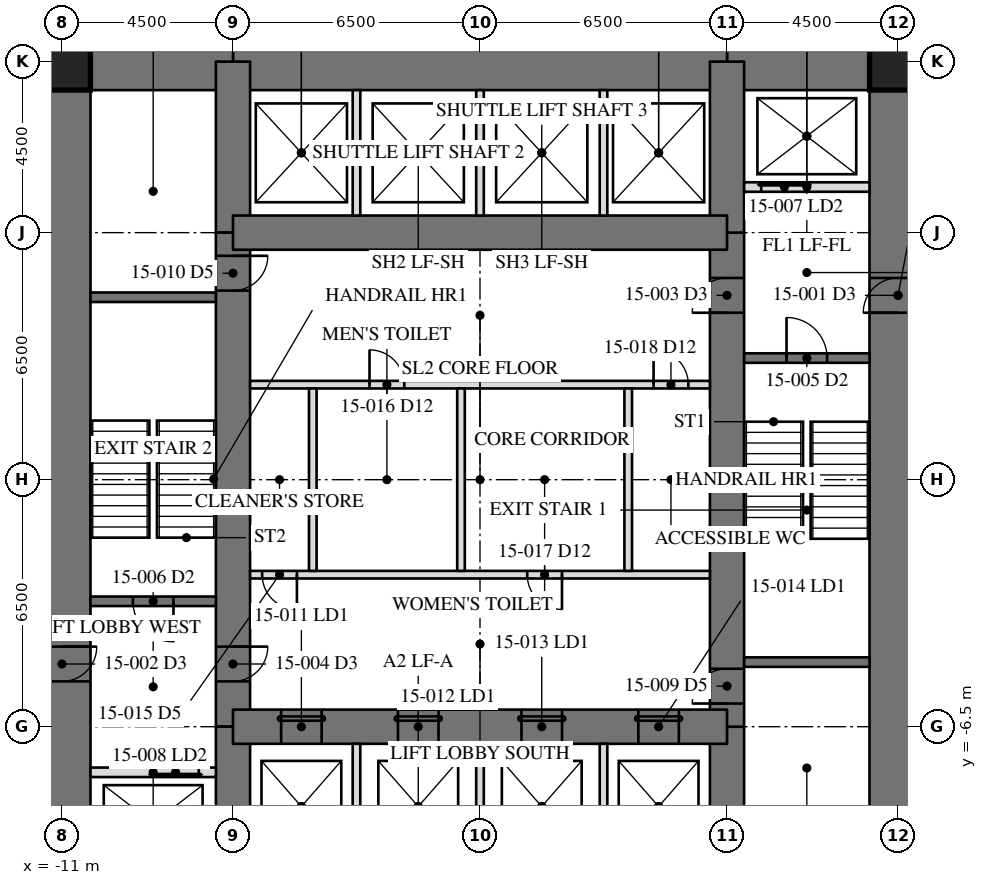
"""IFC4 building model, lengths in metres.
Left out: names, types, materials, properties, quantities, classifications, styles, units other than length and angle.
Written with IfcOpenShell. Run it as: python <this file> out.ifc"""

import sys

from ifc_helpers import new_model, si_unit, direction, frame, frame_2d, origin, origin_2d, place, context, subcontext, project, spatial, rectangle, hollow_rectangle, extrude, element, fill, save


model = new_model("IFC4")
c1 = context("Model", 3, precision=1e-05, world=origin(), true_north=direction((0.0, 1.0)))
c2 = subcontext(c1, "Body", "Model", "MODEL_VIEW")
j1 = project(units=[si_unit("LENGTHUNIT", "METRE"), si_unit("PLANEANGLEUNIT", "RADIAN")], contexts=[c1])
p1 = place(None, origin())
s1 = spatial("IfcSite", under=j1, at=p1, CompositionType="ELEMENT")
p2 = place(p1, origin())
s2 = spatial("IfcBuilding", under=s1, at=p2, CompositionType="ELEMENT")
p3 = place(p2, frame((0.0, 0.0, 65.2)))
s3 = spatial("IfcBuildingStorey", under=s2, at=p3, CompositionType="ELEMENT", Elevation=65.2)
p4 = place(p3, frame((11.0, -11.0, 0.0), z_axis=(0.0, 0.0, 1.0), x_axis=(0.0, 1.0, 0.0)))
e1 = element("IfcWall", 1, at=p4, inside=s3, PredefinedType="SHEAR", context=c2, shape_type="SweptSolid", body=[
    extrude(rectangle(XDim=22.0, YDim=1.5, at=frame_2d((11.0, 0.0))), origin(), (0.0, 0.0, 1.0), 4.1),
])
p5 = place(p4, frame((15.393, 0.0, 0.0)))
e2 = element("IfcOpeningElement", 2, at=p5, cuts=e1, PredefinedType="OPENING", context=c2, shape_type="SweptSolid", body=[
    extrude(rectangle(XDim=0.915, YDim=2.134, at=frame_2d((0.458, 1.067))), frame((0.0, 0.76, 0.0), z_axis=(0.0, -1.0, 0.0), x_axis=(1.0, 0.0, 0.0)), (0.0, 0.0, 1.0), 1.52),
])
p6 = place(p3, frame((-11.0, 11.0, 0.0), z_axis=(0.0, 0.0, 1.0), x_axis=(0.0, -1.0, 0.0)))
e3 = element("IfcWall", 3, at=p6, inside=s3, PredefinedType="SHEAR", context=c2, shape_type="SweptSolid", body=[
    extrude(rectangle(XDim=22.0, YDim=1.5, at=frame_2d((11.0, 0.0))), origin(), (0.0, 0.0, 1.0), 4.1),
])
p7 = place(p6, frame((15.393, 0.0, 0.0)))
e4 = element("IfcOpeningElement", 4, at=p7, cuts=e3, PredefinedType="OPENING", context=c2, shape_type="SweptSolid", body=[
    extrude(rectangle(XDim=0.915, YDim=2.134, at=frame_2d((0.458, 1.067))), frame((0.0, 0.76, 0.0), z_axis=(0.0, -1.0, 0.0), x_axis=(1.0, 0.0, 0.0)), (0.0, 0.0, 1.0), 1.52),
])
p8 = place(p3, frame((11.0, 11.0, 0.0), z_axis=(0.0, 0.0, 1.0), x_axis=(-1.0, 0.0, 0.0)))
e5 = element("IfcWall", 5, at=p8, inside=s3, PredefinedType="SHEAR", context=c2, shape_type="SweptSolid", body=[
    extrude(rectangle(XDim=4.5, YDim=1.5, at=frame_2d((2.25, 0.0))), origin(), (0.0, 0.0, 1.0), 4.1),
])
p9 = place(p3, frame((6.5, 11.0, 0.0), z_axis=(0.0, 0.0, 1.0), x_axis=(-1.0, 0.0, 0.0)))
e6 = element("IfcWall", 6, at=p9, inside=s3, PredefinedType="SHEAR", context=c2, shape_type="SweptSolid", body=[
    extrude(rectangle(XDim=13.0, YDim=1.5, at=frame_2d((6.5, 0.0))), origin(), (0.0, 0.0, 1.0), 4.1),
])
p10 = place(p3, frame((-6.5, 11.0, 0.0), z_axis=(0.0, 0.0, 1.0), x_axis=(-1.0, 0.0, 0.0)))
e7 = element("IfcWall", 7, at=p10, inside=s3, PredefinedType="SHEAR", context=c2, shape_type="SweptSolid", body=[
    extrude(rectangle(XDim=4.5, YDim=1.5, at=frame_2d((2.25, 0.0))), origin(), (0.0, 0.0, 1.0), 4.1),
])
p11 = place(p3, frame((6.5, -11.0, 0.0), z_axis=(0.0, 0.0, 1.0), x_axis=(0.0, 1.0, 0.0)))
e8 = element("IfcWall", 8, at=p11, inside=s3, PredefinedType="SHEAR", context=c2, shape_type="SweptSolid", body=[
    extrude(rectangle(XDim=4.5, YDim=0.9, at=frame_2d((2.25, 0.0))), origin(), (0.0, 0.0, 1.0), 4.1),
])
p12 = place(p3, frame((6.5, -6.5, 0.0), z_axis=(0.0, 0.0, 1.0), x_axis=(0.0, 1.0, 0.0)))
e9 = element("IfcWall", 9, at=p12, inside=s3, PredefinedType="SHEAR", context=c2, shape_type="SweptSolid", body=[
    extrude(rectangle(XDim=13.0, YDim=0.9, at=frame_2d((6.5, 0.0))), origin(), (0.0, 0.0, 1.0), 4.1),
])
p13 = place(p12, frame((10.893, 0.0, 0.0)))
e10 = element("IfcOpeningElement", 10, at=p13, cuts=e9, PredefinedType="OPENING", context=c2, shape_type="SweptSolid", body=[
    extrude(rectangle(XDim=0.915, YDim=2.134, at=frame_2d((0.458, 1.067))), frame((0.0, 0.46, 0.0), z_axis=(0.0, -1.0, 0.0), x_axis=(1.0, 0.0, 0.0)), (0.0, 0.0, 1.0), 0.92),
])
p14 = place(p12, frame((0.61, 0.0, 0.0)))
e11 = element("IfcOpeningElement", 11, at=p14, cuts=e9, PredefinedType="OPENING", context=c2, shape_type="SweptSolid", body=[
    extrude(rectangle(XDim=0.915, YDim=2.134, at=frame_2d((0.458, 1.067))), frame((0.0, 0.46, 0.0), z_axis=(0.0, -1.0, 0.0), x_axis=(1.0, 0.0, 0.0)), (0.0, 0.0, 1.0), 0.92),
])
for number, where, z_axis, x_axis in (
    (12, (6.5, 6.5, 0.0), (0.0, 0.0, 1.0), (0.0, 1.0, 0.0)),
    (13, (-6.5, 11.0, 0.0), (0.0, 0.0, 1.0), (0.0, -1.0, 0.0)),
):
    element("IfcWall", number, at=place(p3, frame(where, z_axis=z_axis, x_axis=x_axis)), inside=s3, PredefinedType="SHEAR", context=c2, shape_type="SweptSolid", body=[
        extrude(rectangle(XDim=4.5, YDim=0.9, at=frame_2d((2.25, 0.0))), origin(), (0.0, 0.0, 1.0), 4.1),
    ])
p15 = place(p3, frame((-6.5, 6.5, 0.0), z_axis=(0.0, 0.0, 1.0), x_axis=(0.0, -1.0, 0.0)))
e14 = element("IfcWall", 14, at=p15, inside=s3, PredefinedType="SHEAR", context=c2, shape_type="SweptSolid", body=[
    extrude(rectangle(XDim=13.0, YDim=0.9, at=frame_2d((6.5, 0.0))), origin(), (0.0, 0.0, 1.0), 4.1),
])
p16 = place(p15, frame((10.893, 0.0, 0.0)))
e15 = element("IfcOpeningElement", 15, at=p16, cuts=e14, PredefinedType="OPENING", context=c2, shape_type="SweptSolid", body=[
    extrude(rectangle(XDim=0.915, YDim=2.134, at=frame_2d((0.458, 1.067))), frame((0.0, 0.46, 0.0), z_axis=(0.0, -1.0, 0.0), x_axis=(1.0, 0.0, 0.0)), (0.0, 0.0, 1.0), 0.92),
])
p17 = place(p15, frame((0.61, 0.0, 0.0)))
e16 = element("IfcOpeningElement", 16, at=p17, cuts=e14, PredefinedType="OPENING", context=c2, shape_type="SweptSolid", body=[
    extrude(rectangle(XDim=0.915, YDim=2.134, at=frame_2d((0.458, 1.067))), frame((0.0, 0.46, 0.0), z_axis=(0.0, -1.0, 0.0), x_axis=(1.0, 0.0, 0.0)), (0.0, 0.0, 1.0), 0.92),
])
p18 = place(p3, frame((-6.5, -6.5, 0.0), z_axis=(0.0, 0.0, 1.0), x_axis=(0.0, -1.0, 0.0)))
e17 = element("IfcWall", 17, at=p18, inside=s3, PredefinedType="SHEAR", context=c2, shape_type="SweptSolid", body=[
    extrude(rectangle(XDim=4.5, YDim=0.9, at=frame_2d((2.25, 0.0))), origin(), (0.0, 0.0, 1.0), 4.1),
])
p19 = place(p3, frame((6.5, 6.5, 0.0), z_axis=(0.0, 0.0, 1.0), x_axis=(-1.0, 0.0, 0.0)))
e18 = element("IfcWall", 18, at=p19, inside=s3, PredefinedType="SHEAR", context=c2, shape_type="SweptSolid", body=[
    extrude(rectangle(XDim=13.0, YDim=0.9, at=frame_2d((6.5, 0.0))), origin(), (0.0, 0.0, 1.0), 4.1),
])
p20 = place(p3, frame((-6.5, -6.5, 0.0), z_axis=(0.0, 0.0, 1.0), x_axis=(1.0, 0.0, 0.0)))
e19 = element("IfcWall", 19, at=p20, inside=s3, PredefinedType="SHEAR", context=c2, shape_type="SweptSolid", body=[
    extrude(rectangle(XDim=13.0, YDim=0.9, at=frame_2d((6.5, 0.0))), origin(), (0.0, 0.0, 1.0), 4.1),
])
p21 = place(p20, frame((1.267, 0.0, 0.0)))
e20 = element("IfcOpeningElement", 20, at=p21, cuts=e19, PredefinedType="OPENING", context=c2, shape_type="SweptSolid", body=[
    extrude(rectangle(XDim=1.067, YDim=2.134, at=frame_2d((0.533, 1.067))), frame((0.0, 0.46, 0.0), z_axis=(0.0, -1.0, 0.0), x_axis=(1.0, 0.0, 0.0)), (0.0, 0.0, 1.0), 0.92),
])
p22 = place(p20, frame((4.342, 0.0, 0.0)))
e21 = element("IfcOpeningElement", 21, at=p22, cuts=e19, PredefinedType="OPENING", context=c2, shape_type="SweptSolid", body=[
    extrude(rectangle(XDim=1.067, YDim=2.134, at=frame_2d((0.533, 1.067))), frame((0.0, 0.46, 0.0), z_axis=(0.0, -1.0, 0.0), x_axis=(1.0, 0.0, 0.0)), (0.0, 0.0, 1.0), 0.92),
])
p23 = place(p20, frame((7.592, 0.0, 0.0)))
e22 = element("IfcOpeningElement", 22, at=p23, cuts=e19, PredefinedType="OPENING", context=c2, shape_type="SweptSolid", body=[
    extrude(rectangle(XDim=1.067, YDim=2.134, at=frame_2d((0.533, 1.067))), frame((0.0, 0.46, 0.0), z_axis=(0.0, -1.0, 0.0), x_axis=(1.0, 0.0, 0.0)), (0.0, 0.0, 1.0), 0.92),
])
p24 = place(p20, frame((10.667, 0.0, 0.0)))
e23 = element("IfcOpeningElement", 23, at=p24, cuts=e19, PredefinedType="OPENING", context=c2, shape_type="SweptSolid", body=[
    extrude(rectangle(XDim=1.067, YDim=2.134, at=frame_2d((0.533, 1.067))), frame((0.0, 0.46, 0.0), z_axis=(0.0, -1.0, 0.0), x_axis=(1.0, 0.0, 0.0)), (0.0, 0.0, 1.0), 0.92),
])
for number, where, z_axis, x_axis in (
    (24, (11.0, 11.0, 0.0), (0.0, 0.0, 1.0), (1.0, 0.0, 0.0)),
    (25, (-11.0, 11.0, 0.0), (0.0, 0.0, 1.0), (1.0, 0.0, 0.0)),
):
    element("IfcColumn", number, at=place(p3, frame(where, z_axis=z_axis, x_axis=x_axis)), inside=s3, PredefinedType="COLUMN", context=c2, shape_type="SweptSolid", body=[
        extrude(hollow_rectangle(XDim=1.499, YDim=1.499, WallThickness=0.102, at=origin_2d()), origin(), (0.0, 0.0, 1.0), 4.1),
    ])
for number, where, z_axis, x_axis in (
    (26, (6.95, -4.8, 0.0), (0.0, 0.0, 1.0), (1.0, 0.0, 0.0)),
    (27, (-6.95, 4.8, 0.0), (0.0, 0.0, 1.0), (-1.0, 0.0, 0.0)),
):
    element("IfcWall", number, at=place(p3, frame(where, z_axis=z_axis, x_axis=x_axis)), inside=s3, PredefinedType="SOLIDWALL", context=c2, shape_type="SweptSolid", body=[
        extrude(rectangle(XDim=3.3, YDim=0.25, at=frame_2d((1.65, 0.0))), origin(), (0.0, 0.0, 1.0), 3.91),
    ])
p25 = place(p3, frame((6.95, 3.2, 0.0), z_axis=(0.0, 0.0, 1.0), x_axis=(1.0, 0.0, 0.0)))
e28 = element("IfcWall", 28, at=p25, inside=s3, PredefinedType="SOLIDWALL", context=c2, shape_type="SweptSolid", body=[
    extrude(rectangle(XDim=3.3, YDim=0.25, at=frame_2d((1.65, 0.0))), origin(), (0.0, 0.0, 1.0), 3.91),
])
p26 = place(p25, frame((1.116, 0.0, 0.0)))
e29 = element("IfcOpeningElement", 29, at=p26, cuts=e28, PredefinedType="OPENING", context=c2, shape_type="SweptSolid", body=[
    extrude(rectangle(XDim=1.067, YDim=2.134, at=frame_2d((0.533, 1.067))), frame((0.0, 0.135, 0.0), z_axis=(0.0, -1.0, 0.0), x_axis=(1.0, 0.0, 0.0)), (0.0, 0.0, 1.0), 0.27),
])
p27 = place(p3, frame((-6.95, -3.2, 0.0), z_axis=(0.0, 0.0, 1.0), x_axis=(-1.0, 0.0, 0.0)))
e30 = element("IfcWall", 30, at=p27, inside=s3, PredefinedType="SOLIDWALL", context=c2, shape_type="SweptSolid", body=[
    extrude(rectangle(XDim=3.3, YDim=0.25, at=frame_2d((1.65, 0.0))), origin(), (0.0, 0.0, 1.0), 3.91),
])
p28 = place(p27, frame((1.116, 0.0, 0.0)))
e31 = element("IfcOpeningElement", 31, at=p28, cuts=e30, PredefinedType="OPENING", context=c2, shape_type="SweptSolid", body=[
    extrude(rectangle(XDim=1.067, YDim=2.134, at=frame_2d((0.533, 1.067))), frame((0.0, 0.135, 0.0), z_axis=(0.0, -1.0, 0.0), x_axis=(1.0, 0.0, 0.0)), (0.0, 0.0, 1.0), 0.27),
])
p29 = place(p3, frame((6.95, 7.7, 0.0), z_axis=(0.0, 0.0, 1.0), x_axis=(1.0, 0.0, 0.0)))
e32 = element("IfcWall", 32, at=p29, inside=s3, PredefinedType="PARTITIONING", context=c2, shape_type="SweptSolid", body=[
    extrude(rectangle(XDim=3.3, YDim=0.25, at=frame_2d((1.65, 0.0))), origin(), (0.0, 0.0, 1.0), 3.91),
])
p30 = place(p29, frame((0.45, 0.0, 0.0)))
e33 = element("IfcOpeningElement", 33, at=p30, cuts=e32, PredefinedType="OPENING", context=c2, shape_type="SweptSolid", body=[
    extrude(rectangle(XDim=1.219, YDim=2.134, at=frame_2d((0.609, 1.067))), frame((0.0, 0.135, 0.0), z_axis=(0.0, -1.0, 0.0), x_axis=(1.0, 0.0, 0.0)), (0.0, 0.0, 1.0), 0.27),
])
p31 = place(p3, frame((-6.95, -7.7, 0.0), z_axis=(0.0, 0.0, 1.0), x_axis=(-1.0, 0.0, 0.0)))
e34 = element("IfcWall", 34, at=p31, inside=s3, PredefinedType="PARTITIONING", context=c2, shape_type="SweptSolid", body=[
    extrude(rectangle(XDim=3.3, YDim=0.25, at=frame_2d((1.65, 0.0))), origin(), (0.0, 0.0, 1.0), 3.91),
])
p32 = place(p31, frame((0.45, 0.0, 0.0)))
e35 = element("IfcOpeningElement", 35, at=p32, cuts=e34, PredefinedType="OPENING", context=c2, shape_type="SweptSolid", body=[
    extrude(rectangle(XDim=1.219, YDim=2.134, at=frame_2d((0.609, 1.067))), frame((0.0, 0.135, 0.0), z_axis=(0.0, -1.0, 0.0), x_axis=(1.0, 0.0, 0.0)), (0.0, 0.0, 1.0), 0.27),
])
p33 = place(p3, frame((-6.05, 2.5, 0.0), z_axis=(0.0, 0.0, 1.0), x_axis=(1.0, 0.0, 0.0)))
e36 = element("IfcWall", 36, at=p33, inside=s3, PredefinedType="PARTITIONING", context=c2, shape_type="SweptSolid", body=[
    extrude(rectangle(XDim=12.1, YDim=0.2, at=frame_2d((6.05, 0.0))), origin(), (0.0, 0.0, 1.0), 3.91),
])
p34 = place(p33, frame((3.143, 0.0, 0.0)))
e37 = element("IfcOpeningElement", 37, at=p34, cuts=e36, PredefinedType="OPENING", context=c2, shape_type="SweptSolid", body=[
    extrude(rectangle(XDim=0.915, YDim=2.134, at=frame_2d((0.458, 1.067))), frame((0.0, 0.11, 0.0), z_axis=(0.0, -1.0, 0.0), x_axis=(1.0, 0.0, 0.0)), (0.0, 0.0, 1.0), 0.22),
])
p35 = place(p33, frame((10.617, 0.0, 0.0)))
e38 = element("IfcOpeningElement", 38, at=p35, cuts=e36, PredefinedType="OPENING", context=c2, shape_type="SweptSolid", body=[
    extrude(rectangle(XDim=0.915, YDim=2.134, at=frame_2d((0.458, 1.067))), frame((0.0, 0.11, 0.0), z_axis=(0.0, -1.0, 0.0), x_axis=(1.0, 0.0, 0.0)), (0.0, 0.0, 1.0), 0.22),
])
p36 = place(p3, frame((6.05, -2.5, 0.0), z_axis=(0.0, 0.0, 1.0), x_axis=(-1.0, 0.0, 0.0)))
e39 = element("IfcWall", 39, at=p36, inside=s3, PredefinedType="PARTITIONING", context=c2, shape_type="SweptSolid", body=[
    extrude(rectangle(XDim=12.1, YDim=0.2, at=frame_2d((6.05, 0.0))), origin(), (0.0, 0.0, 1.0), 3.91),
])
p37 = place(p36, frame((10.867, 0.0, 0.0)))
e40 = element("IfcOpeningElement", 40, at=p37, cuts=e39, PredefinedType="OPENING", context=c2, shape_type="SweptSolid", body=[
    extrude(rectangle(XDim=0.915, YDim=2.134, at=frame_2d((0.458, 1.067))), frame((0.0, 0.11, 0.0), z_axis=(0.0, -1.0, 0.0), x_axis=(1.0, 0.0, 0.0)), (0.0, 0.0, 1.0), 0.22),
])
p38 = place(p36, frame((3.893, 0.0, 0.0)))
e41 = element("IfcOpeningElement", 41, at=p38, cuts=e39, PredefinedType="OPENING", context=c2, shape_type="SweptSolid", body=[
    extrude(rectangle(XDim=0.915, YDim=2.134, at=frame_2d((0.458, 1.067))), frame((0.0, 0.11, 0.0), z_axis=(0.0, -1.0, 0.0), x_axis=(1.0, 0.0, 0.0)), (0.0, 0.0, 1.0), 0.22),
])
for number, where, z_axis, x_axis in (
    (42, (-3.25, 6.95, 0.0), (0.0, 0.0, 1.0), (0.0, 1.0, 0.0)),
    (43, (0.0, 6.95, 0.0), (0.0, 0.0, 1.0), (0.0, 1.0, 0.0)),
    (44, (3.25, 6.95, 0.0), (0.0, 0.0, 1.0), (0.0, 1.0, 0.0)),
    (45, (-3.25, -10.25, 0.0), (0.0, 0.0, 1.0), (0.0, 1.0, 0.0)),
    (46, (0.0, -10.25, 0.0), (0.0, 0.0, 1.0), (0.0, 1.0, 0.0)),
    (47, (3.25, -10.25, 0.0), (0.0, 0.0, 1.0), (0.0, 1.0, 0.0)),
):
    element("IfcWall", number, at=place(p3, frame(where, z_axis=z_axis, x_axis=x_axis)), inside=s3, PredefinedType="PARTITIONING", context=c2, shape_type="SweptSolid", body=[
        extrude(rectangle(XDim=3.3, YDim=0.2, at=frame_2d((1.65, 0.0))), origin(), (0.0, 0.0, 1.0), 3.91),
    ])
for number, where, z_axis, x_axis in (
    (48, (-4.4, -2.4, 0.0), (0.0, 0.0, 1.0), (0.0, 1.0, 0.0)),
    (49, (-0.5, -2.4, 0.0), (0.0, 0.0, 1.0), (0.0, 1.0, 0.0)),
    (50, (3.9, -2.4, 0.0), (0.0, 0.0, 1.0), (0.0, 1.0, 0.0)),
):
    element("IfcWall", number, at=place(p3, frame(where, z_axis=z_axis, x_axis=x_axis)), inside=s3, PredefinedType="PARTITIONING", context=c2, shape_type="SweptSolid", body=[
        extrude(rectangle(XDim=4.8, YDim=0.2, at=frame_2d((2.4, 0.0))), origin(), (0.0, 0.0, 1.0), 3.91),
    ])
p39 = place(p13, origin())
e51 = element("IfcDoor", 51, at=p39, inside=s3, OperationType="SINGLE_SWING_RIGHT", PredefinedType="DOOR", context=c2, shape_type="SweptSolid", body=[
    extrude(rectangle(XDim=0.915, YDim=2.134, at=frame_2d((0.458, 1.067))), frame((0.0, -0.375, 0.0), z_axis=(0.0, -1.0, 0.0), x_axis=(1.0, 0.0, 0.0)), (0.0, 0.0, 1.0), 0.05),
])
fill(e10, e51)
p40 = place(p16, origin())
e52 = element("IfcDoor", 52, at=p40, inside=s3, OperationType="SINGLE_SWING_RIGHT", PredefinedType="DOOR", context=c2, shape_type="SweptSolid", body=[
    extrude(rectangle(XDim=0.915, YDim=2.134, at=frame_2d((0.458, 1.067))), frame((0.0, -0.375, 0.0), z_axis=(0.0, -1.0, 0.0), x_axis=(1.0, 0.0, 0.0)), (0.0, 0.0, 1.0), 0.05),
])
fill(e15, e52)
p41 = place(p26, origin())
e53 = element("IfcDoor", 53, at=p41, inside=s3, OperationType="SINGLE_SWING_LEFT", PredefinedType="DOOR", context=c2, shape_type="SweptSolid", body=[
    extrude(rectangle(XDim=1.067, YDim=2.134, at=frame_2d((0.533, 1.067))), frame((0.0, 0.025, 0.0), z_axis=(0.0, -1.0, 0.0), x_axis=(1.0, 0.0, 0.0)), (0.0, 0.0, 1.0), 0.05),
])
fill(e29, e53)
p42 = place(p28, origin())
e54 = element("IfcDoor", 54, at=p42, inside=s3, OperationType="SINGLE_SWING_LEFT", PredefinedType="DOOR", context=c2, shape_type="SweptSolid", body=[
    extrude(rectangle(XDim=1.067, YDim=2.134, at=frame_2d((0.533, 1.067))), frame((0.0, 0.025, 0.0), z_axis=(0.0, -1.0, 0.0), x_axis=(1.0, 0.0, 0.0)), (0.0, 0.0, 1.0), 0.05),
])
fill(e31, e54)
p43 = place(p30, origin())
e55 = element("IfcDoor", 55, at=p43, inside=s3, OperationType="SLIDING_TO_LEFT", PredefinedType="DOOR", context=c2, shape_type="SweptSolid", body=[
    extrude(rectangle(XDim=1.219, YDim=2.134, at=frame_2d((0.609, 1.067))), frame((0.0, 0.025, 0.0), z_axis=(0.0, -1.0, 0.0), x_axis=(1.0, 0.0, 0.0)), (0.0, 0.0, 1.0), 0.05),
])
fill(e33, e55)
p44 = place(p32, origin())
e56 = element("IfcDoor", 56, at=p44, inside=s3, OperationType="SLIDING_TO_LEFT", PredefinedType="DOOR", context=c2, shape_type="SweptSolid", body=[
    extrude(rectangle(XDim=1.219, YDim=2.134, at=frame_2d((0.609, 1.067))), frame((0.0, 0.025, 0.0), z_axis=(0.0, -1.0, 0.0), x_axis=(1.0, 0.0, 0.0)), (0.0, 0.0, 1.0), 0.05),
])
fill(e35, e56)
p45 = place(p14, origin())
e57 = element("IfcDoor", 57, at=p45, inside=s3, OperationType="SINGLE_SWING_RIGHT", PredefinedType="DOOR", context=c2, shape_type="SweptSolid", body=[
    extrude(rectangle(XDim=0.915, YDim=2.134, at=frame_2d((0.458, 1.067))), frame((0.0, -0.375, 0.0), z_axis=(0.0, -1.0, 0.0), x_axis=(1.0, 0.0, 0.0)), (0.0, 0.0, 1.0), 0.05),
])
fill(e11, e57)
p46 = place(p17, origin())
e58 = element("IfcDoor", 58, at=p46, inside=s3, OperationType="SINGLE_SWING_RIGHT", PredefinedType="DOOR", context=c2, shape_type="SweptSolid", body=[
    extrude(rectangle(XDim=0.915, YDim=2.134, at=frame_2d((0.458, 1.067))), frame((0.0, -0.375, 0.0), z_axis=(0.0, -1.0, 0.0), x_axis=(1.0, 0.0, 0.0)), (0.0, 0.0, 1.0), 0.05),
])
fill(e16, e58)
p47 = place(p21, origin())
e59 = element("IfcDoor", 59, at=p47, inside=s3, OperationType="SLIDING_TO_LEFT", PredefinedType="DOOR", context=c2, shape_type="SweptSolid", body=[
    extrude(rectangle(XDim=1.067, YDim=2.134, at=frame_2d((0.533, 1.067))), frame((0.0, -0.375, 0.0), z_axis=(0.0, -1.0, 0.0), x_axis=(1.0, 0.0, 0.0)), (0.0, 0.0, 1.0), 0.05),
])
fill(e20, e59)
p48 = place(p22, origin())
e60 = element("IfcDoor", 60, at=p48, inside=s3, OperationType="SLIDING_TO_LEFT", PredefinedType="DOOR", context=c2, shape_type="SweptSolid", body=[
    extrude(rectangle(XDim=1.067, YDim=2.134, at=frame_2d((0.533, 1.067))), frame((0.0, -0.375, 0.0), z_axis=(0.0, -1.0, 0.0), x_axis=(1.0, 0.0, 0.0)), (0.0, 0.0, 1.0), 0.05),
])
fill(e21, e60)
p49 = place(p23, origin())
e61 = element("IfcDoor", 61, at=p49, inside=s3, OperationType="SLIDING_TO_LEFT", PredefinedType="DOOR", context=c2, shape_type="SweptSolid", body=[
    extrude(rectangle(XDim=1.067, YDim=2.134, at=frame_2d((0.533, 1.067))), frame((0.0, -0.375, 0.0), z_axis=(0.0, -1.0, 0.0), x_axis=(1.0, 0.0, 0.0)), (0.0, 0.0, 1.0), 0.05),
])
fill(e22, e61)
p50 = place(p24, origin())
e62 = element("IfcDoor", 62, at=p50, inside=s3, OperationType="SLIDING_TO_LEFT", PredefinedType="DOOR", context=c2, shape_type="SweptSolid", body=[
    extrude(rectangle(XDim=1.067, YDim=2.134, at=frame_2d((0.533, 1.067))), frame((0.0, -0.375, 0.0), z_axis=(0.0, -1.0, 0.0), x_axis=(1.0, 0.0, 0.0)), (0.0, 0.0, 1.0), 0.05),
])
fill(e23, e62)
p51 = place(p37, origin())
e63 = element("IfcDoor", 63, at=p51, inside=s3, OperationType="SINGLE_SWING_RIGHT", PredefinedType="DOOR", context=c2, shape_type="SweptSolid", body=[
    extrude(rectangle(XDim=0.915, YDim=2.134, at=frame_2d((0.458, 1.067))), frame((0.0, 0.025, 0.0), z_axis=(0.0, -1.0, 0.0), x_axis=(1.0, 0.0, 0.0)), (0.0, 0.0, 1.0), 0.05),
])
fill(e40, e63)
p52 = place(p34, origin())
e64 = element("IfcDoor", 64, at=p52, inside=s3, OperationType="SINGLE_SWING_LEFT", PredefinedType="DOOR", context=c2, shape_type="SweptSolid", body=[
    extrude(rectangle(XDim=0.915, YDim=2.134, at=frame_2d((0.458, 1.067))), frame((0.0, 0.025, 0.0), z_axis=(0.0, -1.0, 0.0), x_axis=(1.0, 0.0, 0.0)), (0.0, 0.0, 1.0), 0.05),
])
fill(e37, e64)
p53 = place(p38, origin())
e65 = element("IfcDoor", 65, at=p53, inside=s3, OperationType="SINGLE_SWING_LEFT", PredefinedType="DOOR", context=c2, shape_type="SweptSolid", body=[
    extrude(rectangle(XDim=0.915, YDim=2.134, at=frame_2d((0.458, 1.067))), frame((0.0, 0.025, 0.0), z_axis=(0.0, -1.0, 0.0), x_axis=(1.0, 0.0, 0.0)), (0.0, 0.0, 1.0), 0.05),
])
fill(e41, e65)
p54 = place(p35, origin())
e66 = element("IfcDoor", 66, at=p54, inside=s3, OperationType="SINGLE_SWING_LEFT", PredefinedType="DOOR", context=c2, shape_type="SweptSolid", body=[
    extrude(rectangle(XDim=0.915, YDim=2.134, at=frame_2d((0.458, 1.067))), frame((0.0, 0.025, 0.0), z_axis=(0.0, -1.0, 0.0), x_axis=(1.0, 0.0, 0.0)), (0.0, 0.0, 1.0), 0.05),
])
fill(e38, e66)
save(model, sys.argv[1])
